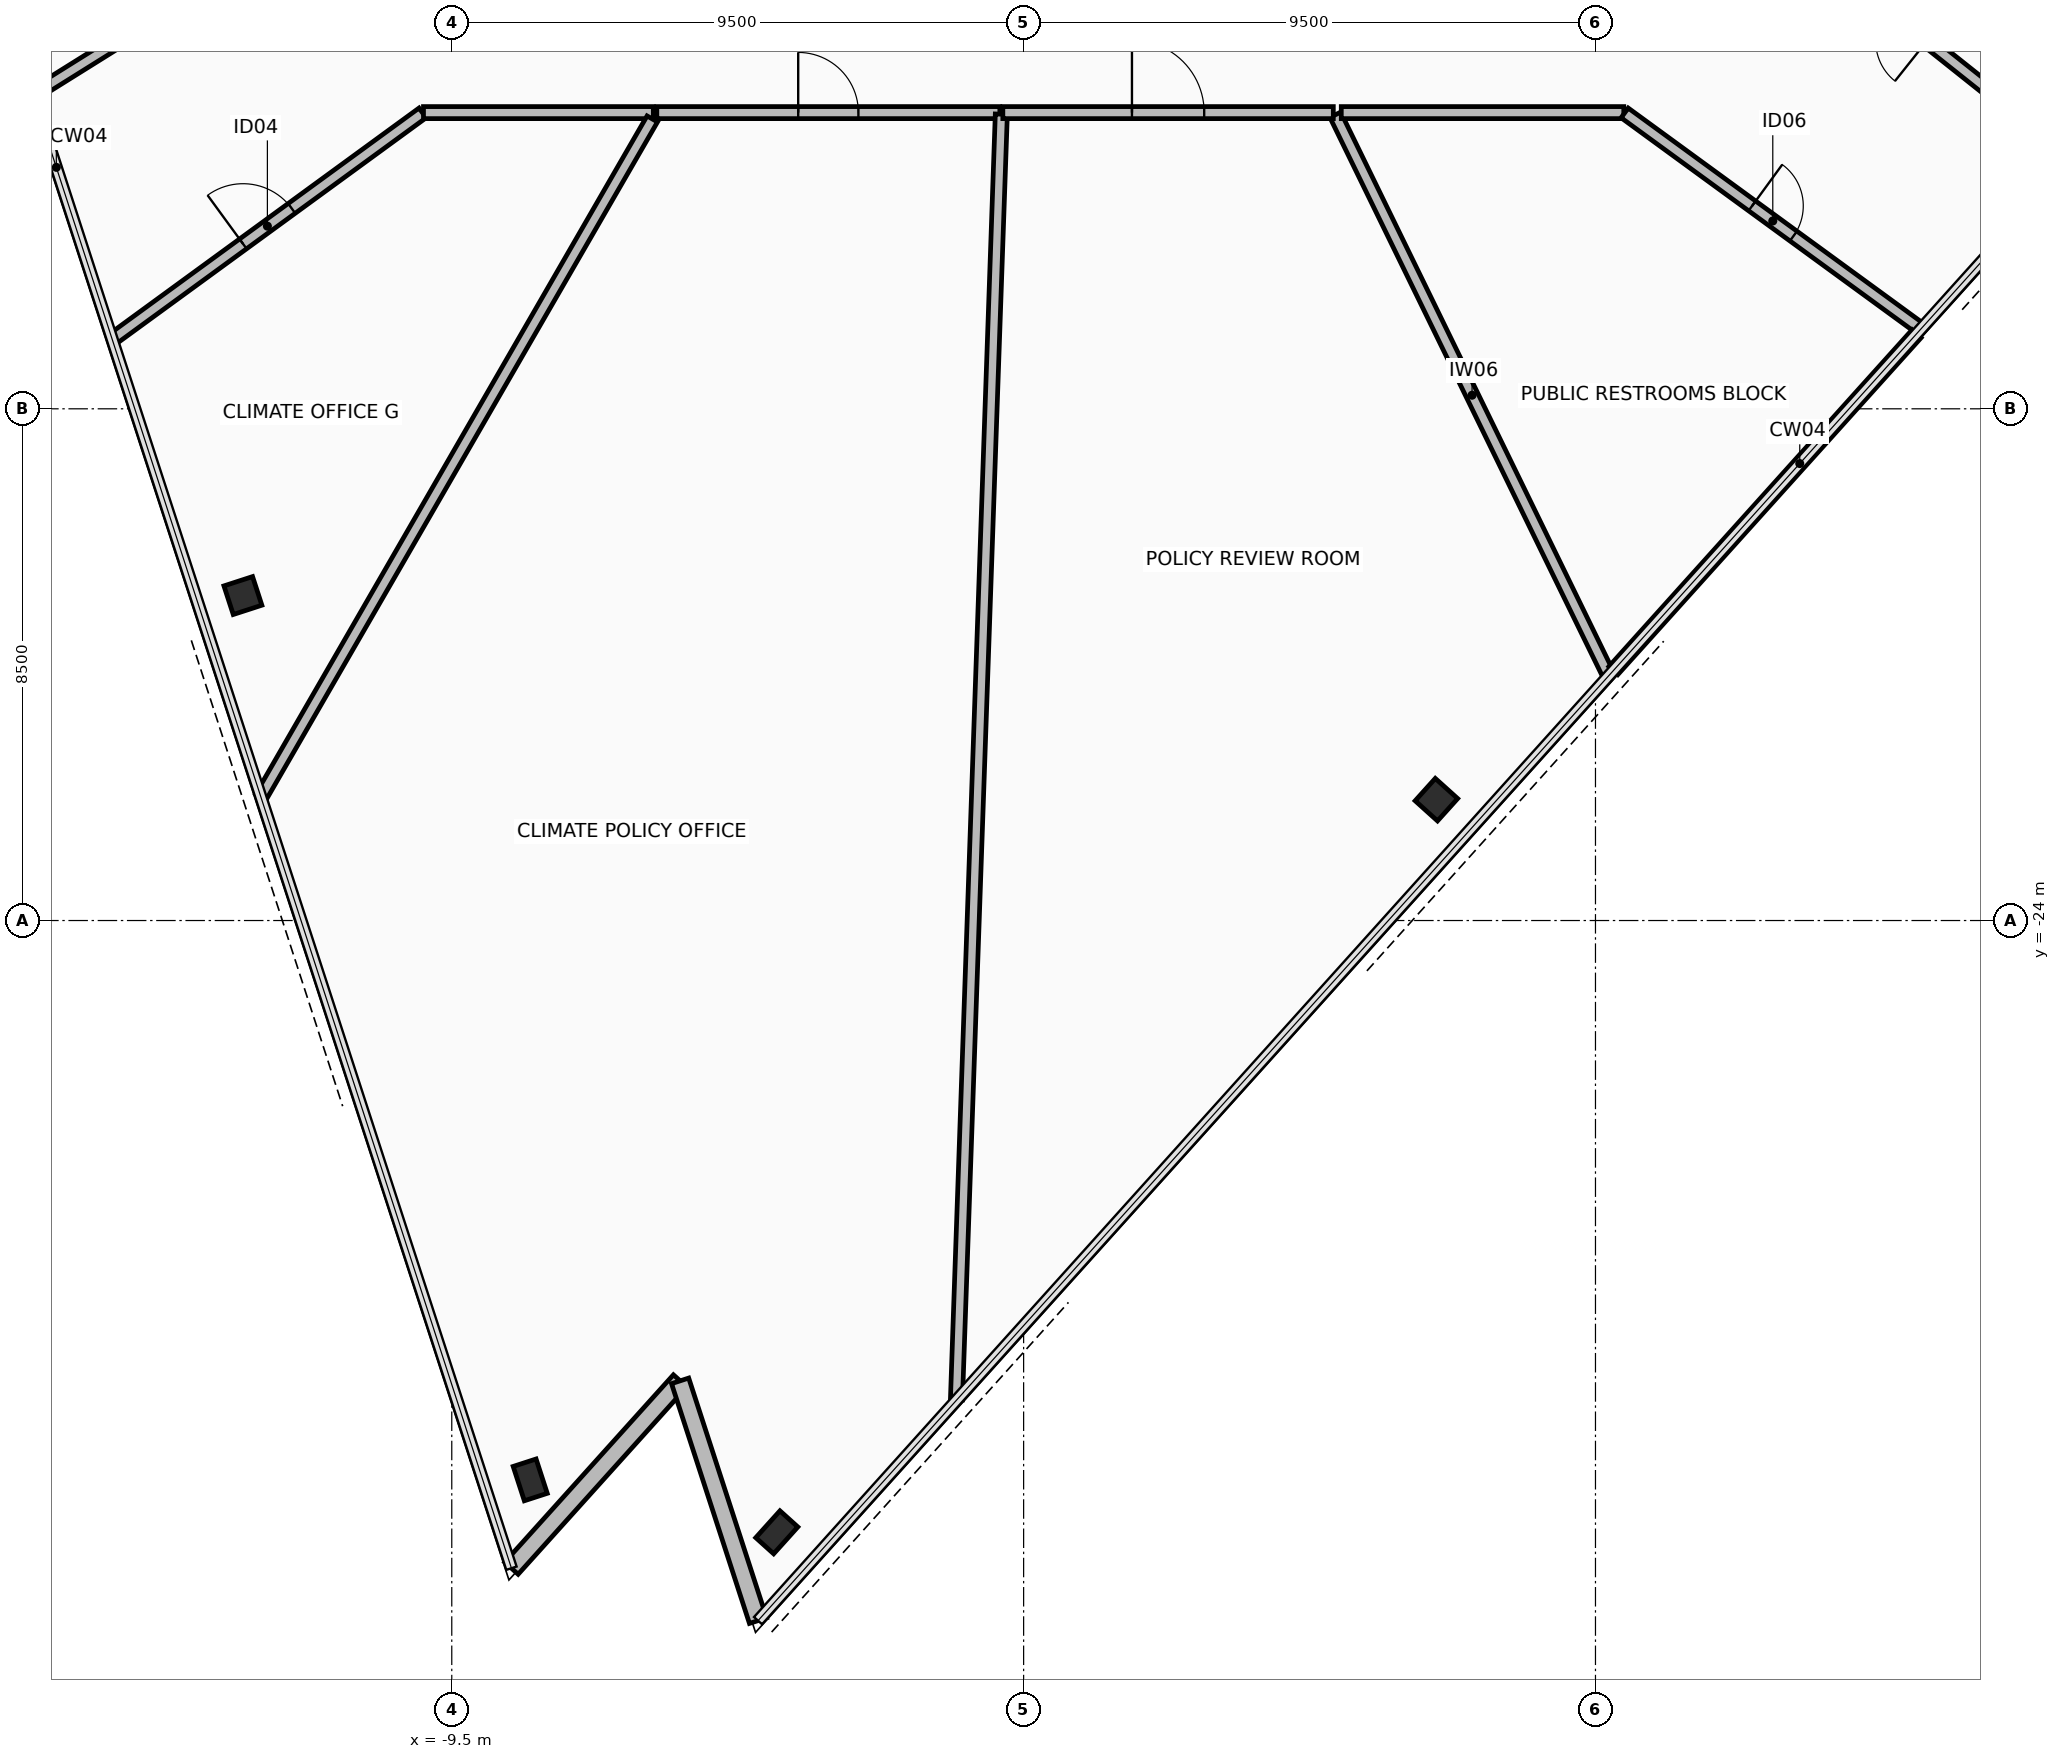
"""IFC4 building model, lengths in metres.
Left out: names, types, materials, properties, quantities, classifications, styles, units other than length and angle.
Written with IfcOpenShell. Run it as: python <this file> out.ifc"""

import sys

from ifc_helpers import new_model, si_unit, direction, frame, frame_2d, origin, origin_2d, place, context, subcontext, project, spatial, rectangle, hollow_rectangle, extrude, element, fill, save


model = new_model("IFC4")
c1 = context("Model", 3, precision=1e-05, world=origin(), true_north=direction((0.0, 1.0)))
c2 = subcontext(c1, "Body", "Model", "MODEL_VIEW")
j1 = project(units=[si_unit("LENGTHUNIT", "METRE"), si_unit("PLANEANGLEUNIT", "RADIAN")], contexts=[c1])
p1 = place(None, origin())
s1 = spatial("IfcSite", under=j1, at=p1, CompositionType="ELEMENT")
p2 = place(p1, origin())
s2 = spatial("IfcBuilding", under=s1, at=p2, CompositionType="ELEMENT")
p3 = place(p2, frame((0.0, 0.0, 214.85)))
s3 = spatial("IfcBuildingStorey", under=s2, at=p3, CompositionType="ELEMENT", Elevation=214.85)
p4 = place(p3, frame((-12.97, -18.602, 0.0), z_axis=(0.0, 0.0, 1.0), x_axis=(-0.309016994375, 0.951056516295, 0.0)))
e1 = element("IfcColumn", 1, at=p4, inside=s3, PredefinedType="COLUMN", context=c2, shape_type="SweptSolid", body=[
    extrude(hollow_rectangle(XDim=0.5, YDim=0.5, WallThickness=0.032, at=origin_2d()), origin(), (0.0, 0.0, 1.0), 3.6),
])
for number, where, z_axis, x_axis in (
    (2, (-8.197, -33.292, 0.0), (0.0, 0.0, 1.0), (-0.309, 0.951, 0.0)),
    (3, (-4.1, -34.162, 0.0), (0.0, 0.0, 1.0), (0.669, 0.743, 0.0)),
):
    element("IfcColumn", number, at=place(p3, frame(where, z_axis=z_axis, x_axis=x_axis)), inside=s3, PredefinedType="COLUMN", context=c2, shape_type="SweptSolid", body=[
        extrude(hollow_rectangle(XDim=0.4, YDim=0.6, WallThickness=0.03, at=origin_2d()), origin(), (0.0, 0.0, 1.0), 3.6),
    ])
p5 = place(p3, frame((6.857, -21.992, 0.0), z_axis=(0.0, 0.0, 1.0), x_axis=(0.669130606359, 0.743144825477, 0.0)))
e4 = element("IfcColumn", 4, at=p5, inside=s3, PredefinedType="COLUMN", context=c2, shape_type="SweptSolid", body=[
    extrude(hollow_rectangle(XDim=0.5, YDim=0.5, WallThickness=0.032, at=origin_2d()), origin(), (0.0, 0.0, 1.0), 3.6),
])
p6 = place(p3, frame((-8.509, -34.759, 0.0), z_axis=(0.0, 0.0, 1.0), x_axis=(0.669151507466, 0.743126005504, 0.0)))
e5 = element("IfcWall", 5, at=p6, inside=s3, PredefinedType="STANDARD", context=c2, shape_type="SweptSolid", body=[
    extrude(rectangle(XDim=4.188, YDim=0.3, at=frame_2d((2.094, 0.0))), origin(), (0.0, 0.0, 1.0), 2.715),
])
p7 = place(p3, frame((-5.706, -31.646, 0.0), z_axis=(0.0, 0.0, 1.0), x_axis=(0.309030708092, -0.951052060329, 0.0)))
e6 = element("IfcWall", 6, at=p7, inside=s3, PredefinedType="STANDARD", context=c2, shape_type="SweptSolid", body=[
    extrude(rectangle(XDim=4.188, YDim=0.3, at=frame_2d((2.094, 0.0))), origin(), (0.0, 0.0, 1.0), 2.715),
])
p8 = place(p3, frame((9.722, -19.932, 0.0), z_axis=(0.0, 0.0, 1.0), x_axis=(-0.43837351414, 0.898792891661, 0.0)))
e7 = element("IfcWall", 7, at=p8, inside=s3, PredefinedType="PARTITIONING", context=c2, shape_type="SweptSolid", body=[
    extrude(rectangle(XDim=10.365, YDim=0.2, at=frame_2d((5.183, 0.0))), origin(), (0.0, 0.0, 1.0), 2.715),
])
p9 = place(p3, frame((5.277, -10.58, 0.0), z_axis=(0.0, 0.0, 1.0), x_axis=(1.0, 0.0, 0.0)))
e8 = element("IfcWall", 8, at=p9, inside=s3, PredefinedType="PARTITIONING", context=c2, shape_type="SweptSolid", body=[
    extrude(rectangle(XDim=4.693, YDim=0.2, at=frame_2d((2.346, 0.0))), origin(), (0.0, 0.0, 1.0), 2.865),
])
p10 = place(p3, frame((9.985, -10.585, 0.0), z_axis=(0.0, 0.0, 1.0), x_axis=(0.807842527243, -0.589398380705, 0.0)))
e9 = element("IfcWall", 9, at=p10, inside=s3, PredefinedType="PARTITIONING", context=c2, shape_type="SweptSolid", body=[
    extrude(rectangle(XDim=6.091, YDim=0.2, at=frame_2d((3.045, 0.0))), origin(), (0.0, 0.0, 1.0), 2.715),
])
p11 = place(p10, frame((2.621, 0.0, 0.0)))
e10 = element("IfcOpeningElement", 10, at=p11, cuts=e9, PredefinedType="OPENING", context=c2, shape_type="SweptSolid", body=[
    extrude(rectangle(XDim=0.85, YDim=2.1, at=frame_2d((0.425, 1.05))), frame((0.0, 0.11, 0.0), z_axis=(0.0, -1.0, 0.0), x_axis=(1.0, 0.0, 0.0)), (0.0, 0.0, 1.0), 0.22),
])
p12 = place(p3, frame((14.835, -14.253, 0.0), z_axis=(0.0, 0.0, 1.0), x_axis=(-0.669136711987, -0.7431393279, 0.0)))
e11 = element("IfcWall", 11, at=p12, inside=s3, PredefinedType="PARTITIONING", context=c2, shape_type="SweptSolid", body=[
    extrude(rectangle(XDim=7.529, YDim=0.2, at=frame_2d((3.764, 0.0))), origin(), (0.0, 0.0, 1.0), 3.42),
])
p13 = place(p3, frame((17.456, -11.342, 0.0), z_axis=(0.0, 0.0, 1.0), x_axis=(-0.782369623791, 0.622814395923, 0.0)))
e12 = element("IfcWall", 12, at=p13, inside=s3, PredefinedType="PARTITIONING", context=c2, shape_type="SweptSolid", body=[
    extrude(rectangle(XDim=7.115, YDim=0.2, at=frame_2d((3.558, 0.0))), origin(), (0.0, 0.0, 1.0), 2.715),
])
p14 = place(p13, frame((3.133, 0.0, 0.0)))
e13 = element("IfcOpeningElement", 13, at=p14, cuts=e12, PredefinedType="OPENING", context=c2, shape_type="SweptSolid", body=[
    extrude(rectangle(XDim=0.85, YDim=2.1, at=frame_2d((0.425, 1.05))), frame((0.0, 0.11, 0.0), z_axis=(0.0, -1.0, 0.0), x_axis=(1.0, 0.0, 0.0)), (0.0, 0.0, 1.0), 0.22),
])
p15 = place(p3, frame((-14.919, -9.323, 0.0), z_axis=(0.0, 0.0, 1.0), x_axis=(-0.84803603548, -0.529938564861, 0.0)))
e14 = element("IfcWall", 14, at=p15, inside=s3, PredefinedType="PARTITIONING", context=c2, shape_type="SweptSolid", body=[
    extrude(rectangle(XDim=1.817, YDim=0.2, at=frame_2d((0.909, 0.0))), origin(), (0.0, 0.0, 1.0), 2.715),
])
p16 = place(p3, frame((-15.141, -14.347, 0.0), z_axis=(0.0, 0.0, 1.0), x_axis=(0.807843616105, 0.589396888284, 0.0)))
e15 = element("IfcWall", 15, at=p16, inside=s3, PredefinedType="PARTITIONING", context=c2, shape_type="SweptSolid", body=[
    extrude(rectangle(XDim=6.383, YDim=0.2, at=frame_2d((3.191, 0.0))), origin(), (0.0, 0.0, 1.0), 2.715),
])
p17 = place(p16, frame((2.691, 0.0, 0.0)))
e16 = element("IfcOpeningElement", 16, at=p17, cuts=e15, PredefinedType="OPENING", context=c2, shape_type="SweptSolid", body=[
    extrude(rectangle(XDim=1.0, YDim=2.15, at=frame_2d((0.5, 1.075))), frame((0.0, 0.11, 0.0), z_axis=(0.0, -1.0, 0.0), x_axis=(1.0, 0.0, 0.0)), (0.0, 0.0, 1.0), 0.22),
])
p18 = place(p3, frame((-9.97, -10.58, 0.0), z_axis=(0.0, 0.0, 1.0), x_axis=(1.0, 0.0, 0.0)))
e17 = element("IfcWall", 17, at=p18, inside=s3, PredefinedType="PARTITIONING", context=c2, shape_type="SweptSolid", body=[
    extrude(rectangle(XDim=3.818, YDim=0.2, at=frame_2d((1.909, 0.0))), origin(), (0.0, 0.0, 1.0), 2.865),
])
p19 = place(p3, frame((-6.169, -10.685, 0.0), z_axis=(0.0, 0.0, 1.0), x_axis=(-0.500003586584, -0.866023333059, 0.0)))
e18 = element("IfcWall", 18, at=p19, inside=s3, PredefinedType="PARTITIONING", context=c2, shape_type="SweptSolid", body=[
    extrude(rectangle(XDim=13.005, YDim=0.2, at=frame_2d((6.502, 0.0))), origin(), (0.0, 0.0, 1.0), 2.715),
])
p20 = place(p3, frame((-6.094, -10.58, 0.0), z_axis=(0.0, 0.0, 1.0), x_axis=(1.0, 0.0, 0.0)))
e19 = element("IfcWall", 19, at=p20, inside=s3, PredefinedType="PARTITIONING", context=c2, shape_type="SweptSolid", body=[
    extrude(rectangle(XDim=5.699, YDim=0.2, at=frame_2d((2.849, 0.0))), origin(), (0.0, 0.0, 1.0), 2.865),
])
p21 = place(p20, frame((2.349, 0.0, 0.0)))
e20 = element("IfcOpeningElement", 20, at=p21, cuts=e19, PredefinedType="OPENING", context=c2, shape_type="SweptSolid", body=[
    extrude(rectangle(XDim=1.0, YDim=2.15, at=frame_2d((0.5, 1.075))), frame((0.0, 0.11, 0.0), z_axis=(0.0, -1.0, 0.0), x_axis=(1.0, 0.0, 0.0)), (0.0, 0.0, 1.0), 0.22),
])
p22 = place(p3, frame((-0.37, -10.606, 0.0), z_axis=(0.0, 0.0, 1.0), x_axis=(-0.034906571944, -0.999390579921, 0.0)))
e21 = element("IfcWall", 21, at=p22, inside=s3, PredefinedType="PARTITIONING", context=c2, shape_type="SweptSolid", body=[
    extrude(rectangle(XDim=21.367, YDim=0.2, at=frame_2d((10.684, 0.0))), origin(), (0.0, 0.0, 1.0), 2.715),
])
p23 = place(p3, frame((-0.345, -10.58, 0.0), z_axis=(0.0, 0.0, 1.0), x_axis=(1.0, 0.0, 0.0)))
e22 = element("IfcWall", 22, at=p23, inside=s3, PredefinedType="PARTITIONING", context=c2, shape_type="SweptSolid", body=[
    extrude(rectangle(XDim=5.49, YDim=0.2, at=frame_2d((2.745, 0.0))), origin(), (0.0, 0.0, 1.0), 3.42),
])
p24 = place(p23, frame((2.145, 0.0, 0.0)))
e23 = element("IfcOpeningElement", 23, at=p24, cuts=e22, PredefinedType="OPENING", context=c2, shape_type="SweptSolid", body=[
    extrude(rectangle(XDim=1.2, YDim=2.15, at=frame_2d((0.6, 1.075))), frame((0.0, 0.11, 0.0), z_axis=(0.0, -1.0, 0.0), x_axis=(1.0, 0.0, 0.0)), (0.0, 0.0, 1.0), 0.22),
])
p25 = place(p11, origin())
e24 = element("IfcDoor", 24, at=p25, inside=s3, OperationType="SINGLE_SWING_RIGHT", PredefinedType="DOOR", context=c2, shape_type="SweptSolid", body=[
    extrude(rectangle(XDim=0.85, YDim=2.1, at=frame_2d((0.425, 1.05))), frame((0.0, 0.025, 0.0), z_axis=(0.0, -1.0, 0.0), x_axis=(1.0, 0.0, 0.0)), (0.0, 0.0, 1.0), 0.05),
])
fill(e10, e24)
p26 = place(p17, origin())
e25 = element("IfcDoor", 25, at=p26, inside=s3, OperationType="SINGLE_SWING_RIGHT", PredefinedType="DOOR", context=c2, shape_type="SweptSolid", body=[
    extrude(rectangle(XDim=1.0, YDim=2.15, at=frame_2d((0.5, 1.075))), frame((0.0, 0.025, 0.0), z_axis=(0.0, -1.0, 0.0), x_axis=(1.0, 0.0, 0.0)), (0.0, 0.0, 1.0), 0.05),
])
fill(e16, e25)
p27 = place(p21, origin())
e26 = element("IfcDoor", 26, at=p27, inside=s3, OperationType="SINGLE_SWING_RIGHT", PredefinedType="DOOR", context=c2, shape_type="SweptSolid", body=[
    extrude(rectangle(XDim=1.0, YDim=2.15, at=frame_2d((0.5, 1.075))), frame((0.0, 0.025, 0.0), z_axis=(0.0, -1.0, 0.0), x_axis=(1.0, 0.0, 0.0)), (0.0, 0.0, 1.0), 0.05),
])
fill(e20, e26)
p28 = place(p24, origin())
e27 = element("IfcDoor", 27, at=p28, inside=s3, OperationType="SINGLE_SWING_LEFT", PredefinedType="DOOR", context=c2, shape_type="SweptSolid", body=[
    extrude(rectangle(XDim=1.2, YDim=2.15, at=frame_2d((0.6, 1.075))), frame((0.0, 0.025, 0.0), z_axis=(0.0, -1.0, 0.0), x_axis=(1.0, 0.0, 0.0)), (0.0, 0.0, 1.0), 0.05),
])
fill(e23, e27)
save(model, sys.argv[1])
